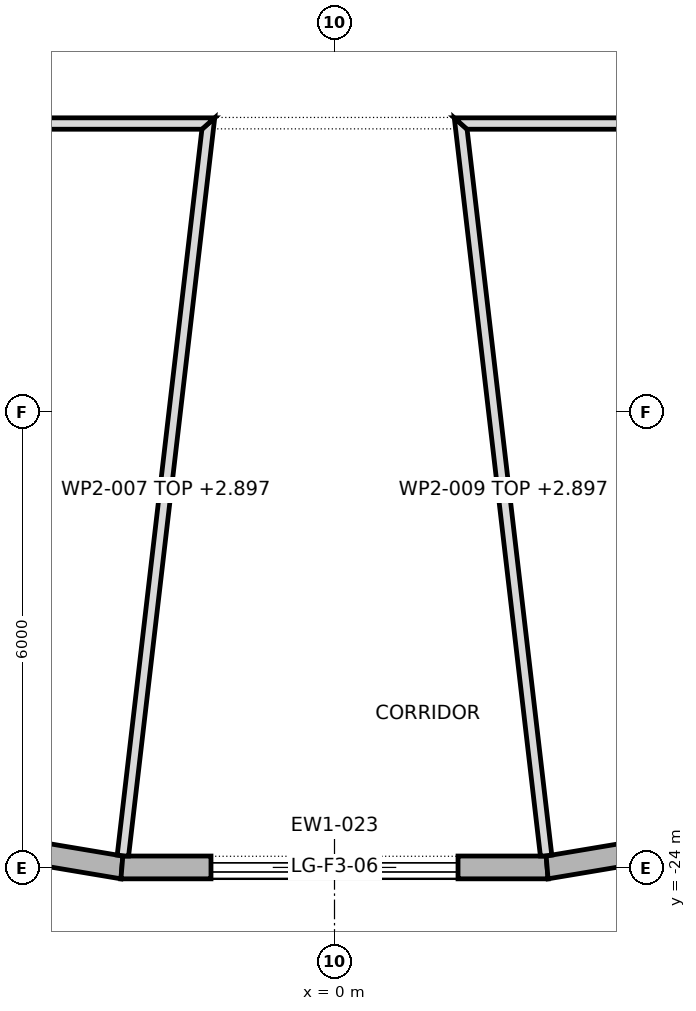
"""IFC4 building model, lengths in metres.
Left out: names, types, materials, properties, quantities, classifications, styles, units other than length and angle.
Written with IfcOpenShell. Run it as: python <this file> out.ifc"""

import sys

from ifc_helpers import new_model, si_unit, direction, frame, frame_2d, origin, place, context, subcontext, project, spatial, polyline, rectangle, outline, extrude, element, fill, save


model = new_model("IFC4")
c1 = context("Model", 3, precision=1e-05, world=origin(), true_north=direction((0.0, 1.0)))
c2 = subcontext(c1, "Body", "Model", "MODEL_VIEW")
j1 = project(units=[si_unit("LENGTHUNIT", "METRE"), si_unit("PLANEANGLEUNIT", "RADIAN")], contexts=[c1])
p1 = place(None, origin())
s1 = spatial("IfcSite", under=j1, at=p1, CompositionType="ELEMENT")
p2 = place(p1, origin())
s2 = spatial("IfcBuilding", under=s1, at=p2, CompositionType="ELEMENT")
p3 = place(p2, frame((0.0, 0.0, 238.9)))
s3 = spatial("IfcBuildingStorey", under=s2, at=p3, CompositionType="ELEMENT", Elevation=238.9)
p4 = place(p3, frame((-8.284, -23.066, 0.0), z_axis=(0.0, 0.0, 1.0), x_axis=(0.98622977737, -0.16538085206, 0.0)))
e1 = element("IfcWall", 1, at=p4, inside=s3, PredefinedType="STANDARD", context=c2, shape_type="SweptSolid", body=[
    extrude(outline(polyline([(-0.013, -0.15), (5.576, -0.15), (5.552, 0.15), (0.013, 0.15), (-0.013, -0.15)])), origin(), (0.0, 0.0, 1.0), 3.7),
])
p5 = place(p4, frame((1.157, 0.0, 0.6)))
e2 = element("IfcOpeningElement", 2, at=p5, cuts=e1, PredefinedType="OPENING", context=c2, shape_type="SweptSolid", body=[
    extrude(rectangle(XDim=3.25, YDim=2.65, at=frame_2d((1.625, 1.325))), frame((0.0, 0.162, 0.0), z_axis=(0.0, -1.0, 0.0), x_axis=(1.0, 0.0, 0.0)), (0.0, 0.0, 1.0), 0.324),
])
p6 = place(p3, frame((-2.797, -23.987, 0.0), z_axis=(0.0, 0.0, 1.0), x_axis=(1.0, 0.0, 0.0)))
e3 = element("IfcWall", 3, at=p6, inside=s3, PredefinedType="STANDARD", context=c2, shape_type="SweptSolid", body=[
    extrude(outline(polyline([(-0.012, -0.15), (5.607, -0.15), (5.582, 0.15), (0.012, 0.15), (-0.012, -0.15)])), origin(), (0.0, 0.0, 1.0), 3.7),
])
p7 = place(p6, frame((1.172, 0.0, 0.0)))
e4 = element("IfcOpeningElement", 4, at=p7, cuts=e3, PredefinedType="OPENING", context=c2, shape_type="SweptSolid", body=[
    extrude(rectangle(XDim=3.25, YDim=3.25, at=frame_2d((1.625, 1.625))), frame((0.0, 0.162, 0.0), z_axis=(0.0, -1.0, 0.0), x_axis=(1.0, 0.0, 0.0)), (0.0, 0.0, 1.0), 0.324),
])
p8 = place(p3, frame((2.797, -23.987, 0.0), z_axis=(0.0, 0.0, 1.0), x_axis=(0.98622977737, 0.16538085206, 0.0)))
e5 = element("IfcWall", 5, at=p8, inside=s3, PredefinedType="STANDARD", context=c2, shape_type="SweptSolid", body=[
    extrude(outline(polyline([(-0.012, -0.15), (5.577, -0.15), (5.551, 0.15), (0.012, 0.15), (-0.012, -0.15)])), origin(), (0.0, 0.0, 1.0), 3.7),
])
p9 = place(p8, frame((1.157, 0.0, 0.6)))
e6 = element("IfcOpeningElement", 6, at=p9, cuts=e5, PredefinedType="OPENING", context=c2, shape_type="SweptSolid", body=[
    extrude(rectangle(XDim=3.25, YDim=2.65, at=frame_2d((1.625, 1.325))), frame((0.0, 0.162, 0.0), z_axis=(0.0, -1.0, 0.0), x_axis=(1.0, 0.0, 0.0)), (0.0, 0.0, 1.0), 0.324),
])
p10 = place(p3, frame((-2.784, -23.833, 0.0), z_axis=(0.0, 0.0, 1.0), x_axis=(0.115927481877, 0.993257680034, 0.0)))
e7 = element("IfcWall", 7, at=p10, inside=s3, PredefinedType="PARTITIONING", context=c2, shape_type="SweptSolid", body=[
    extrude(outline(polyline([(0.005, -0.075), (1.96, -0.075), (3.916, -0.075), (5.871, -0.075), (7.827, -0.075), (9.782, -0.075), (9.698, 0.0), (9.614, 0.075), (7.691, 0.075), (5.768, 0.075), (3.845, 0.075), (1.923, 0.075), (0.0, 0.075), (0.0, -0.035), (0.005, -0.075)])), origin(), (0.0, 0.0, 1.0), 2.897),
])
p11 = place(p3, frame((-1.576, -14.2, 0.0), z_axis=(0.0, 0.0, 1.0), x_axis=(-1.0, 0.0, 0.0)))
e8 = element("IfcWall", 8, at=p11, inside=s3, PredefinedType="PARTITIONING", context=c2, shape_type="SweptSolid", body=[
    extrude(outline(polyline([(0.0, -0.075), (1.793, -0.075), (3.585, -0.075), (5.378, -0.075), (7.171, -0.075), (8.964, -0.075), (10.757, -0.075), (12.549, -0.075), (12.699, 0.075), (10.909, 0.075), (9.119, 0.075), (7.329, 0.075), (5.539, 0.075), (3.749, 0.075), (1.958, 0.075), (0.168, 0.075), (0.0, -0.075)])), origin(), (0.0, 0.0, 1.0), 3.7),
])
p12 = place(p3, frame((1.65, -14.116, 0.0), z_axis=(0.0, 0.0, 1.0), x_axis=(0.115927481877, -0.993257680034, 0.0)))
e9 = element("IfcWall", 9, at=p12, inside=s3, PredefinedType="PARTITIONING", context=c2, shape_type="SweptSolid", body=[
    extrude(outline(polyline([(0.0, -0.075), (1.956, -0.075), (3.911, -0.075), (5.867, -0.075), (7.822, -0.075), (9.778, -0.075), (9.782, -0.035), (9.782, 0.075), (7.859, 0.075), (5.937, 0.075), (4.014, 0.075), (2.091, 0.075), (0.168, 0.075), (0.084, 0.0), (0.0, -0.075)])), origin(), (0.0, 0.0, 1.0), 2.897),
])
p13 = place(p3, frame((14.275, -14.2, 0.0), z_axis=(0.0, 0.0, 1.0), x_axis=(-1.0, 0.0, 0.0)))
e10 = element("IfcWall", 10, at=p13, inside=s3, PredefinedType="PARTITIONING", context=c2, shape_type="SweptSolid", body=[
    extrude(outline(polyline([(0.15, -0.075), (1.943, -0.075), (3.735, -0.075), (5.528, -0.075), (7.321, -0.075), (9.114, -0.075), (10.906, -0.075), (12.699, -0.075), (12.531, 0.075), (10.741, 0.075), (8.95, 0.075), (7.16, 0.075), (5.37, 0.075), (3.58, 0.075), (1.79, 0.075), (0.0, 0.075), (0.15, -0.075)])), origin(), (0.0, 0.0, 1.0), 3.7),
])
p14 = place(p13, frame((5.445, 0.0, 0.0)))
e11 = element("IfcOpeningElement", 11, at=p14, cuts=e10, PredefinedType="OPENING", context=c2, shape_type="SweptSolid", body=[
    extrude(rectangle(XDim=1.8, YDim=2.1, at=frame_2d((0.9, 1.05))), frame((0.0, 0.087, 0.0), z_axis=(0.0, -1.0, 0.0), x_axis=(1.0, 0.0, 0.0)), (0.0, 0.0, 1.0), 0.174),
])
p15 = place(p7, origin())
e12 = element("IfcDoor", 12, at=p15, inside=s3, OperationType="DOUBLE_DOOR_SLIDING", PredefinedType="DOOR", context=c2, shape_type="SweptSolid", body=[
    extrude(rectangle(XDim=3.25, YDim=3.25, at=frame_2d((1.625, 1.625))), frame((0.0, 0.025, 0.0), z_axis=(0.0, -1.0, 0.0), x_axis=(1.0, 0.0, 0.0)), (0.0, 0.0, 1.0), 0.05),
])
fill(e4, e12)
save(model, sys.argv[1])
